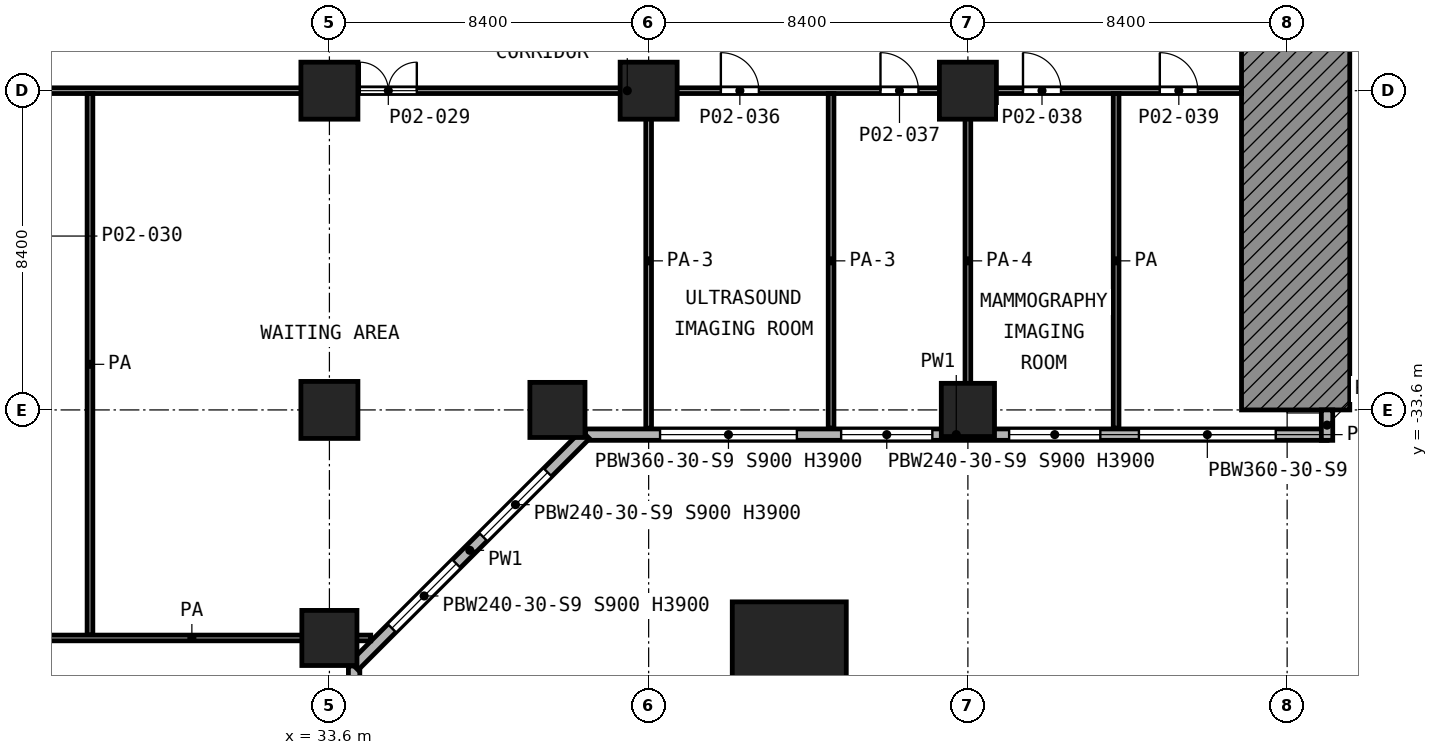
"""IFC4 building model, lengths in metres.
Left out: names, types, materials, properties, quantities, classifications, styles, units other than length and angle.
Written with IfcOpenShell. Run it as: python <this file> out.ifc"""

import sys

from ifc_helpers import new_model, si_unit, direction, frame, frame_2d, origin, origin_2d, place, context, subcontext, project, spatial, polyline, rectangle, outline, extrude, element, fill, save


model = new_model("IFC4")
c1 = context("Model", 3, precision=1e-05, world=origin(), true_north=direction((0.0, 1.0)))
c2 = subcontext(c1, "Body", "Model", "MODEL_VIEW")
j1 = project(units=[si_unit("LENGTHUNIT", "METRE"), si_unit("PLANEANGLEUNIT", "RADIAN")], contexts=[c1])
p1 = place(None, origin())
s1 = spatial("IfcSite", under=j1, at=p1, CompositionType="ELEMENT")
p2 = place(p1, origin())
s2 = spatial("IfcBuilding", under=s1, at=p2, CompositionType="ELEMENT")
p3 = place(p2, frame((0.0, 0.0, 7.0)))
s3 = spatial("IfcBuildingStorey", under=s2, at=p3, CompositionType="ELEMENT", Elevation=7.0)
for number, where, z_axis, x_axis in (
    (1, (33.6, -25.2, 0.0), (0.0, 0.0, 1.0), (1.0, 0.0, 0.0)),
    (2, (42.0, -25.2, 0.0), (0.0, 0.0, 1.0), (1.0, 0.0, 0.0)),
    (3, (50.4, -25.2, 0.0), (0.0, 0.0, 1.0), (1.0, 0.0, 0.0)),
    (4, (33.6, -33.6, 0.0), (0.0, 0.0, 1.0), (1.0, 0.0, 0.0)),
):
    element("IfcColumn", number, at=place(p3, frame(where, z_axis=z_axis, x_axis=x_axis)), inside=s3, PredefinedType="COLUMN", context=c2, shape_type="SweptSolid", body=[
        extrude(rectangle(XDim=1.5, YDim=1.5, at=origin_2d()), origin(), (0.0, 0.0, 1.0), 5.6),
    ])
p4 = place(p3, frame((39.6, -33.6, 0.0), z_axis=(0.0, 0.0, 1.0), x_axis=(1.0, 0.0, 0.0)))
e5 = element("IfcColumn", 5, at=p4, inside=s3, PredefinedType="COLUMN", context=c2, shape_type="SweptSolid", body=[
    extrude(rectangle(XDim=1.45, YDim=1.45, at=origin_2d()), origin(), (0.0, 0.0, 1.0), 5.6),
])
p5 = place(p3, frame((50.4, -33.6, 0.0), z_axis=(0.0, 0.0, 1.0), x_axis=(1.0, 0.0, 0.0)))
e6 = element("IfcColumn", 6, at=p5, inside=s3, PredefinedType="COLUMN", context=c2, shape_type="SweptSolid", body=[
    extrude(rectangle(XDim=1.4, YDim=1.4, at=origin_2d()), origin(), (0.0, 0.0, 1.0), 5.6),
])
p6 = place(p3, frame((33.6, -39.6, 0.0), z_axis=(0.0, 0.0, 1.0), x_axis=(1.0, 0.0, 0.0)))
e7 = element("IfcColumn", 7, at=p6, inside=s3, PredefinedType="COLUMN", context=c2, shape_type="SweptSolid", body=[
    extrude(rectangle(XDim=1.45, YDim=1.45, at=origin_2d()), origin(), (0.0, 0.0, 1.0), 5.6),
])
p7 = place(p3, frame((0.0, 0.0, -7.0), z_axis=(0.0, -1.0, 0.0), x_axis=(1.0, 0.0, 0.0)))
e8 = element("IfcWall", 8, at=p7, inside=s3, PredefinedType="SHEAR", context=c2, shape_type="SweptSolid", body=[
    extrude(outline(polyline([(60.448, 12.6), (60.159, 11.256), (60.0, 9.0), (60.0, 7.0), (57.6, 7.0), (57.6, 12.6), (60.448, 12.6)])), origin(), (0.0, 0.0, 1.0), 33.6),
])
p8 = place(p3, frame((45.7, -39.85, 0.0), z_axis=(0.0, 0.0, 1.0), x_axis=(1.0, 0.0, 0.0)))
e9 = element("IfcColumn", 9, at=p8, inside=s3, PredefinedType="COLUMN", context=c2, shape_type="SweptSolid", body=[
    extrude(rectangle(XDim=3.0, YDim=2.4, at=origin_2d()), origin(), (0.0, 0.0, 1.0), 5.6),
])
p9 = place(p3, frame((34.25, -78.738, 0.0), z_axis=(0.0, 0.0, 1.0), x_axis=(0.0, 1.0, 0.0)))
e10 = element("IfcWall", 10, at=p9, inside=s3, PredefinedType="SOLIDWALL", context=c2, shape_type="SweptSolid", body=[
    extrude(rectangle(XDim=38.4, YDim=0.3, at=frame_2d((19.2, 0.0))), origin(), (0.0, 0.0, 1.0), 5.25),
])
p10 = place(p9, frame((1.61, 0.0, 0.9)))
e11 = element("IfcOpeningElement", 11, at=p10, cuts=e10, PredefinedType="OPENING", context=c2, shape_type="SweptSolid", body=[
    extrude(rectangle(XDim=1.2, YDim=3.0, at=frame_2d((0.6, 1.5))), frame((0.0, 0.16, 0.0), z_axis=(0.0, -1.0, 0.0), x_axis=(1.0, 0.0, 0.0)), (0.0, 0.0, 1.0), 0.32),
])
p11 = place(p9, frame((3.438, 0.0, 0.9)))
e12 = element("IfcOpeningElement", 12, at=p11, cuts=e10, PredefinedType="OPENING", context=c2, shape_type="SweptSolid", body=[
    extrude(rectangle(XDim=3.6, YDim=3.0, at=frame_2d((1.8, 1.5))), frame((0.0, 0.16, 0.0), z_axis=(0.0, -1.0, 0.0), x_axis=(1.0, 0.0, 0.0)), (0.0, 0.0, 1.0), 0.32),
])
p12 = place(p9, frame((8.203, 0.0, 0.9)))
e13 = element("IfcOpeningElement", 13, at=p12, cuts=e10, PredefinedType="OPENING", context=c2, shape_type="SweptSolid", body=[
    extrude(rectangle(XDim=2.4, YDim=3.0, at=frame_2d((1.2, 1.5))), frame((0.0, 0.16, 0.0), z_axis=(0.0, -1.0, 0.0), x_axis=(1.0, 0.0, 0.0)), (0.0, 0.0, 1.0), 0.32),
])
p13 = place(p9, frame((12.623, 0.0, 0.9)))
e14 = element("IfcOpeningElement", 14, at=p13, cuts=e10, PredefinedType="OPENING", context=c2, shape_type="SweptSolid", body=[
    extrude(rectangle(XDim=2.4, YDim=3.0, at=frame_2d((1.2, 1.5))), frame((0.0, 0.16, 0.0), z_axis=(0.0, -1.0, 0.0), x_axis=(1.0, 0.0, 0.0)), (0.0, 0.0, 1.0), 0.32),
])
p14 = place(p9, frame((16.378, 0.0, 0.9)))
e15 = element("IfcOpeningElement", 15, at=p14, cuts=e10, PredefinedType="OPENING", context=c2, shape_type="SweptSolid", body=[
    extrude(rectangle(XDim=2.4, YDim=3.0, at=frame_2d((1.2, 1.5))), frame((0.0, 0.16, 0.0), z_axis=(0.0, -1.0, 0.0), x_axis=(1.0, 0.0, 0.0)), (0.0, 0.0, 1.0), 0.32),
])
p15 = place(p9, frame((21.098, 0.0, 0.9)))
e16 = element("IfcOpeningElement", 16, at=p15, cuts=e10, PredefinedType="OPENING", context=c2, shape_type="SweptSolid", body=[
    extrude(rectangle(XDim=2.4, YDim=3.0, at=frame_2d((1.2, 1.5))), frame((0.0, 0.16, 0.0), z_axis=(0.0, -1.0, 0.0), x_axis=(1.0, 0.0, 0.0)), (0.0, 0.0, 1.0), 0.32),
])
p16 = place(p9, frame((24.778, 0.0, 0.9)))
e17 = element("IfcOpeningElement", 17, at=p16, cuts=e10, PredefinedType="OPENING", context=c2, shape_type="SweptSolid", body=[
    extrude(rectangle(XDim=2.4, YDim=3.0, at=frame_2d((1.2, 1.5))), frame((0.0, 0.16, 0.0), z_axis=(0.0, -1.0, 0.0), x_axis=(1.0, 0.0, 0.0)), (0.0, 0.0, 1.0), 0.32),
])
p17 = place(p9, frame((29.498, 0.0, 0.9)))
e18 = element("IfcOpeningElement", 18, at=p17, cuts=e10, PredefinedType="OPENING", context=c2, shape_type="SweptSolid", body=[
    extrude(rectangle(XDim=2.4, YDim=3.0, at=frame_2d((1.2, 1.5))), frame((0.0, 0.16, 0.0), z_axis=(0.0, -1.0, 0.0), x_axis=(1.0, 0.0, 0.0)), (0.0, 0.0, 1.0), 0.32),
])
p18 = place(p9, frame((32.838, 0.0, 0.9)))
e19 = element("IfcOpeningElement", 19, at=p18, cuts=e10, PredefinedType="OPENING", context=c2, shape_type="SweptSolid", body=[
    extrude(rectangle(XDim=3.6, YDim=3.0, at=frame_2d((1.8, 1.5))), frame((0.0, 0.16, 0.0), z_axis=(0.0, -1.0, 0.0), x_axis=(1.0, 0.0, 0.0)), (0.0, 0.0, 1.0), 0.32),
])
p19 = place(p3, frame((34.25, -40.338, 0.0), z_axis=(0.0, 0.0, 1.0), x_axis=(0.707106781187, 0.707106781187, 0.0)))
e20 = element("IfcWall", 20, at=p19, inside=s3, PredefinedType="SOLIDWALL", context=c2, shape_type="SweptSolid", body=[
    extrude(rectangle(XDim=8.61, YDim=0.3, at=frame_2d((4.305, 0.0))), origin(), (0.0, 0.0, 1.0), 5.25),
])
p20 = place(p19, frame((1.406, 0.0, 0.9)))
e21 = element("IfcOpeningElement", 21, at=p20, cuts=e20, PredefinedType="OPENING", context=c2, shape_type="SweptSolid", body=[
    extrude(rectangle(XDim=2.4, YDim=3.0, at=frame_2d((1.2, 1.5))), frame((0.0, 0.16, 0.0), z_axis=(0.0, -1.0, 0.0), x_axis=(1.0, 0.0, 0.0)), (0.0, 0.0, 1.0), 0.32),
])
p21 = place(p19, frame((4.803, 0.0, 0.9)))
e22 = element("IfcOpeningElement", 22, at=p21, cuts=e20, PredefinedType="OPENING", context=c2, shape_type="SweptSolid", body=[
    extrude(rectangle(XDim=2.4, YDim=3.0, at=frame_2d((1.2, 1.5))), frame((0.0, 0.16, 0.0), z_axis=(0.0, -1.0, 0.0), x_axis=(1.0, 0.0, 0.0)), (0.0, 0.0, 1.0), 0.32),
])
p22 = place(p3, frame((40.338, -34.25, 0.0), z_axis=(0.0, 0.0, 1.0), x_axis=(1.0, 0.0, 0.0)))
e23 = element("IfcWall", 23, at=p22, inside=s3, PredefinedType="SOLIDWALL", context=c2, shape_type="SweptSolid", body=[
    extrude(rectangle(XDim=19.512, YDim=0.3, at=frame_2d((9.756, 0.0))), origin(), (0.0, 0.0, 1.0), 5.25),
])
p23 = place(p22, frame((1.962, 0.0, 0.9)))
e24 = element("IfcOpeningElement", 24, at=p23, cuts=e23, PredefinedType="OPENING", context=c2, shape_type="SweptSolid", body=[
    extrude(rectangle(XDim=3.6, YDim=3.0, at=frame_2d((1.8, 1.5))), frame((0.0, 0.16, 0.0), z_axis=(0.0, -1.0, 0.0), x_axis=(1.0, 0.0, 0.0)), (0.0, 0.0, 1.0), 0.32),
])
p24 = place(p22, frame((6.727, 0.0, 0.9)))
e25 = element("IfcOpeningElement", 25, at=p24, cuts=e23, PredefinedType="OPENING", context=c2, shape_type="SweptSolid", body=[
    extrude(rectangle(XDim=2.4, YDim=3.0, at=frame_2d((1.2, 1.5))), frame((0.0, 0.16, 0.0), z_axis=(0.0, -1.0, 0.0), x_axis=(1.0, 0.0, 0.0)), (0.0, 0.0, 1.0), 0.32),
])
p25 = place(p22, frame((11.147, 0.0, 0.9)))
e26 = element("IfcOpeningElement", 26, at=p25, cuts=e23, PredefinedType="OPENING", context=c2, shape_type="SweptSolid", body=[
    extrude(rectangle(XDim=2.4, YDim=3.0, at=frame_2d((1.2, 1.5))), frame((0.0, 0.16, 0.0), z_axis=(0.0, -1.0, 0.0), x_axis=(1.0, 0.0, 0.0)), (0.0, 0.0, 1.0), 0.32),
])
p26 = place(p22, frame((14.562, 0.0, 0.9)))
e27 = element("IfcOpeningElement", 27, at=p26, cuts=e23, PredefinedType="OPENING", context=c2, shape_type="SweptSolid", body=[
    extrude(rectangle(XDim=3.6, YDim=3.0, at=frame_2d((1.8, 1.5))), frame((0.0, 0.16, 0.0), z_axis=(0.0, -1.0, 0.0), x_axis=(1.0, 0.0, 0.0)), (0.0, 0.0, 1.0), 0.32),
])
p27 = place(p3, frame((59.85, -34.4, 0.0), z_axis=(0.0, 0.0, 1.0), x_axis=(0.0, 1.0, 0.0)))
e28 = element("IfcWall", 28, at=p27, inside=s3, PredefinedType="SOLIDWALL", context=c2, shape_type="SweptSolid", body=[
    extrude(rectangle(XDim=0.8, YDim=0.3, at=frame_2d((0.4, 0.0))), origin(), (0.0, 0.0, 1.0), 5.25),
])
p28 = place(p3, frame((25.275, -39.6, 0.0), z_axis=(0.0, 0.0, 1.0), x_axis=(1.0, 0.0, 0.0)))
e29 = element("IfcWall", 29, at=p28, inside=s3, PredefinedType="PARTITIONING", context=c2, shape_type="SweptSolid", body=[
    extrude(rectangle(XDim=9.412, YDim=0.15, at=frame_2d((4.706, 0.0))), origin(), (0.0, 0.0, 1.0), 5.25),
])
p29 = place(p3, frame((25.275, -25.2, 0.0), z_axis=(0.0, 0.0, 1.0), x_axis=(1.0, 0.0, 0.0)))
e30 = element("IfcWall", 30, at=p29, inside=s3, PredefinedType="PARTITIONING", context=c2, shape_type="SweptSolid", body=[
    extrude(rectangle(XDim=32.325, YDim=0.15, at=frame_2d((16.163, 0.0))), origin(), (0.0, 0.0, 1.0), 5.25),
])
p30 = place(p29, frame((18.625, 0.0, 0.0)))
e31 = element("IfcOpeningElement", 31, at=p30, cuts=e30, PredefinedType="OPENING", context=c2, shape_type="SweptSolid", body=[
    extrude(rectangle(XDim=1.0, YDim=2.1, at=frame_2d((0.5, 1.05))), frame((0.0, 0.085, 0.0), z_axis=(0.0, -1.0, 0.0), x_axis=(1.0, 0.0, 0.0)), (0.0, 0.0, 1.0), 0.17),
])
p31 = place(p29, frame((22.825, 0.0, 0.0)))
e32 = element("IfcOpeningElement", 32, at=p31, cuts=e30, PredefinedType="OPENING", context=c2, shape_type="SweptSolid", body=[
    extrude(rectangle(XDim=1.0, YDim=2.1, at=frame_2d((0.5, 1.05))), frame((0.0, 0.085, 0.0), z_axis=(0.0, -1.0, 0.0), x_axis=(1.0, 0.0, 0.0)), (0.0, 0.0, 1.0), 0.17),
])
p32 = place(p29, frame((26.575, 0.0, 0.0)))
e33 = element("IfcOpeningElement", 33, at=p32, cuts=e30, PredefinedType="OPENING", context=c2, shape_type="SweptSolid", body=[
    extrude(rectangle(XDim=1.0, YDim=2.1, at=frame_2d((0.5, 1.05))), frame((0.0, 0.085, 0.0), z_axis=(0.0, -1.0, 0.0), x_axis=(1.0, 0.0, 0.0)), (0.0, 0.0, 1.0), 0.17),
])
p33 = place(p29, frame((30.175, 0.0, 0.0)))
e34 = element("IfcOpeningElement", 34, at=p33, cuts=e30, PredefinedType="OPENING", context=c2, shape_type="SweptSolid", body=[
    extrude(rectangle(XDim=1.0, YDim=2.1, at=frame_2d((0.5, 1.05))), frame((0.0, 0.085, 0.0), z_axis=(0.0, -1.0, 0.0), x_axis=(1.0, 0.0, 0.0)), (0.0, 0.0, 1.0), 0.17),
])
p34 = place(p29, frame((9.125, 0.0, 0.0)))
e35 = element("IfcOpeningElement", 35, at=p34, cuts=e30, PredefinedType="OPENING", context=c2, shape_type="SweptSolid", body=[
    extrude(rectangle(XDim=1.5, YDim=2.1, at=frame_2d((0.75, 1.05))), frame((0.0, 0.085, 0.0), z_axis=(0.0, -1.0, 0.0), x_axis=(1.0, 0.0, 0.0)), (0.0, 0.0, 1.0), 0.17),
])
p35 = place(p3, frame((27.3, -39.525, 0.0), z_axis=(0.0, 0.0, 1.0), x_axis=(0.0, 1.0, 0.0)))
e36 = element("IfcWall", 36, at=p35, inside=s3, PredefinedType="PARTITIONING", context=c2, shape_type="SweptSolid", body=[
    extrude(rectangle(XDim=14.25, YDim=0.15, at=frame_2d((7.125, 0.0))), origin(), (0.0, 0.0, 1.0), 5.25),
])
for number, where, z_axis, x_axis in (
    (37, (42.0, -34.08, 0.0), (0.0, 0.0, 1.0), (0.0, 1.0, 0.0)),
    (38, (46.8, -34.08, 0.0), (0.0, 0.0, 1.0), (0.0, 1.0, 0.0)),
):
    element("IfcWall", number, at=place(p3, frame(where, z_axis=z_axis, x_axis=x_axis)), inside=s3, PredefinedType="PARTITIONING", context=c2, shape_type="SweptSolid", body=[
        extrude(rectangle(XDim=8.805, YDim=0.15, at=frame_2d((4.403, 0.0))), origin(), (0.0, 0.0, 1.0), 3.85),
    ])
p36 = place(p3, frame((50.4, -34.08, 0.0), z_axis=(0.0, 0.0, 1.0), x_axis=(0.0, 1.0, 0.0)))
e39 = element("IfcWall", 39, at=p36, inside=s3, PredefinedType="PARTITIONING", context=c2, shape_type="SweptSolid", body=[
    extrude(rectangle(XDim=8.805, YDim=0.15, at=frame_2d((4.403, 0.0))), origin(), (0.0, 0.0, 1.0), 4.35),
])
p37 = place(p3, frame((54.3, -34.08, 0.0), z_axis=(0.0, 0.0, 1.0), x_axis=(0.0, 1.0, 0.0)))
e40 = element("IfcWall", 40, at=p37, inside=s3, PredefinedType="PARTITIONING", context=c2, shape_type="SweptSolid", body=[
    extrude(rectangle(XDim=8.805, YDim=0.15, at=frame_2d((4.403, 0.0))), origin(), (0.0, 0.0, 1.0), 5.25),
])
p38 = place(p20, origin())
e41 = element("IfcWindow", 41, at=p38, inside=s3, PartitioningType="SINGLE_PANEL", PredefinedType="WINDOW", context=c2, shape_type="SweptSolid", body=[
    extrude(rectangle(XDim=2.4, YDim=3.0, at=frame_2d((1.2, 1.5))), frame((0.0, 0.03, 0.0), z_axis=(0.0, -1.0, 0.0), x_axis=(1.0, 0.0, 0.0)), (0.0, 0.0, 1.0), 0.06),
])
fill(e21, e41)
p39 = place(p21, origin())
e42 = element("IfcWindow", 42, at=p39, inside=s3, PartitioningType="SINGLE_PANEL", PredefinedType="WINDOW", context=c2, shape_type="SweptSolid", body=[
    extrude(rectangle(XDim=2.4, YDim=3.0, at=frame_2d((1.2, 1.5))), frame((0.0, 0.03, 0.0), z_axis=(0.0, -1.0, 0.0), x_axis=(1.0, 0.0, 0.0)), (0.0, 0.0, 1.0), 0.06),
])
fill(e22, e42)
p40 = place(p23, origin())
e43 = element("IfcWindow", 43, at=p40, inside=s3, PartitioningType="SINGLE_PANEL", PredefinedType="WINDOW", context=c2, shape_type="SweptSolid", body=[
    extrude(rectangle(XDim=3.6, YDim=3.0, at=frame_2d((1.8, 1.5))), frame((0.0, 0.03, 0.0), z_axis=(0.0, -1.0, 0.0), x_axis=(1.0, 0.0, 0.0)), (0.0, 0.0, 1.0), 0.06),
])
fill(e24, e43)
p41 = place(p24, origin())
e44 = element("IfcWindow", 44, at=p41, inside=s3, PartitioningType="SINGLE_PANEL", PredefinedType="WINDOW", context=c2, shape_type="SweptSolid", body=[
    extrude(rectangle(XDim=2.4, YDim=3.0, at=frame_2d((1.2, 1.5))), frame((0.0, 0.03, 0.0), z_axis=(0.0, -1.0, 0.0), x_axis=(1.0, 0.0, 0.0)), (0.0, 0.0, 1.0), 0.06),
])
fill(e25, e44)
p42 = place(p25, origin())
e45 = element("IfcWindow", 45, at=p42, inside=s3, PartitioningType="SINGLE_PANEL", PredefinedType="WINDOW", context=c2, shape_type="SweptSolid", body=[
    extrude(rectangle(XDim=2.4, YDim=3.0, at=frame_2d((1.2, 1.5))), frame((0.0, 0.03, 0.0), z_axis=(0.0, -1.0, 0.0), x_axis=(1.0, 0.0, 0.0)), (0.0, 0.0, 1.0), 0.06),
])
fill(e26, e45)
p43 = place(p26, origin())
e46 = element("IfcWindow", 46, at=p43, inside=s3, PartitioningType="SINGLE_PANEL", PredefinedType="WINDOW", context=c2, shape_type="SweptSolid", body=[
    extrude(rectangle(XDim=3.6, YDim=3.0, at=frame_2d((1.8, 1.5))), frame((0.0, 0.03, 0.0), z_axis=(0.0, -1.0, 0.0), x_axis=(1.0, 0.0, 0.0)), (0.0, 0.0, 1.0), 0.06),
])
fill(e27, e46)
p44 = place(p30, origin())
e47 = element("IfcDoor", 47, at=p44, inside=s3, OperationType="SINGLE_SWING_LEFT", PredefinedType="DOOR", context=c2, shape_type="SweptSolid", body=[
    extrude(rectangle(XDim=1.0, YDim=2.1, at=frame_2d((0.5, 1.05))), frame((0.0, 0.025, 0.0), z_axis=(0.0, -1.0, 0.0), x_axis=(1.0, 0.0, 0.0)), (0.0, 0.0, 1.0), 0.05),
])
fill(e31, e47)
p45 = place(p31, origin())
e48 = element("IfcDoor", 48, at=p45, inside=s3, OperationType="SINGLE_SWING_LEFT", PredefinedType="DOOR", context=c2, shape_type="SweptSolid", body=[
    extrude(rectangle(XDim=1.0, YDim=2.1, at=frame_2d((0.5, 1.05))), frame((0.0, 0.025, 0.0), z_axis=(0.0, -1.0, 0.0), x_axis=(1.0, 0.0, 0.0)), (0.0, 0.0, 1.0), 0.05),
])
fill(e32, e48)
p46 = place(p32, origin())
e49 = element("IfcDoor", 49, at=p46, inside=s3, OperationType="SINGLE_SWING_LEFT", PredefinedType="DOOR", context=c2, shape_type="SweptSolid", body=[
    extrude(rectangle(XDim=1.0, YDim=2.1, at=frame_2d((0.5, 1.05))), frame((0.0, 0.025, 0.0), z_axis=(0.0, -1.0, 0.0), x_axis=(1.0, 0.0, 0.0)), (0.0, 0.0, 1.0), 0.05),
])
fill(e33, e49)
p47 = place(p33, origin())
e50 = element("IfcDoor", 50, at=p47, inside=s3, OperationType="SINGLE_SWING_LEFT", PredefinedType="DOOR", context=c2, shape_type="SweptSolid", body=[
    extrude(rectangle(XDim=1.0, YDim=2.1, at=frame_2d((0.5, 1.05))), frame((0.0, 0.025, 0.0), z_axis=(0.0, -1.0, 0.0), x_axis=(1.0, 0.0, 0.0)), (0.0, 0.0, 1.0), 0.05),
])
fill(e34, e50)
p48 = place(p34, origin())
e51 = element("IfcDoor", 51, at=p48, inside=s3, OperationType="DOUBLE_DOOR_SINGLE_SWING", PredefinedType="DOOR", context=c2, shape_type="SweptSolid", body=[
    extrude(rectangle(XDim=1.5, YDim=2.1, at=frame_2d((0.75, 1.05))), frame((0.0, 0.025, 0.0), z_axis=(0.0, -1.0, 0.0), x_axis=(1.0, 0.0, 0.0)), (0.0, 0.0, 1.0), 0.05),
])
fill(e35, e51)
save(model, sys.argv[1])
